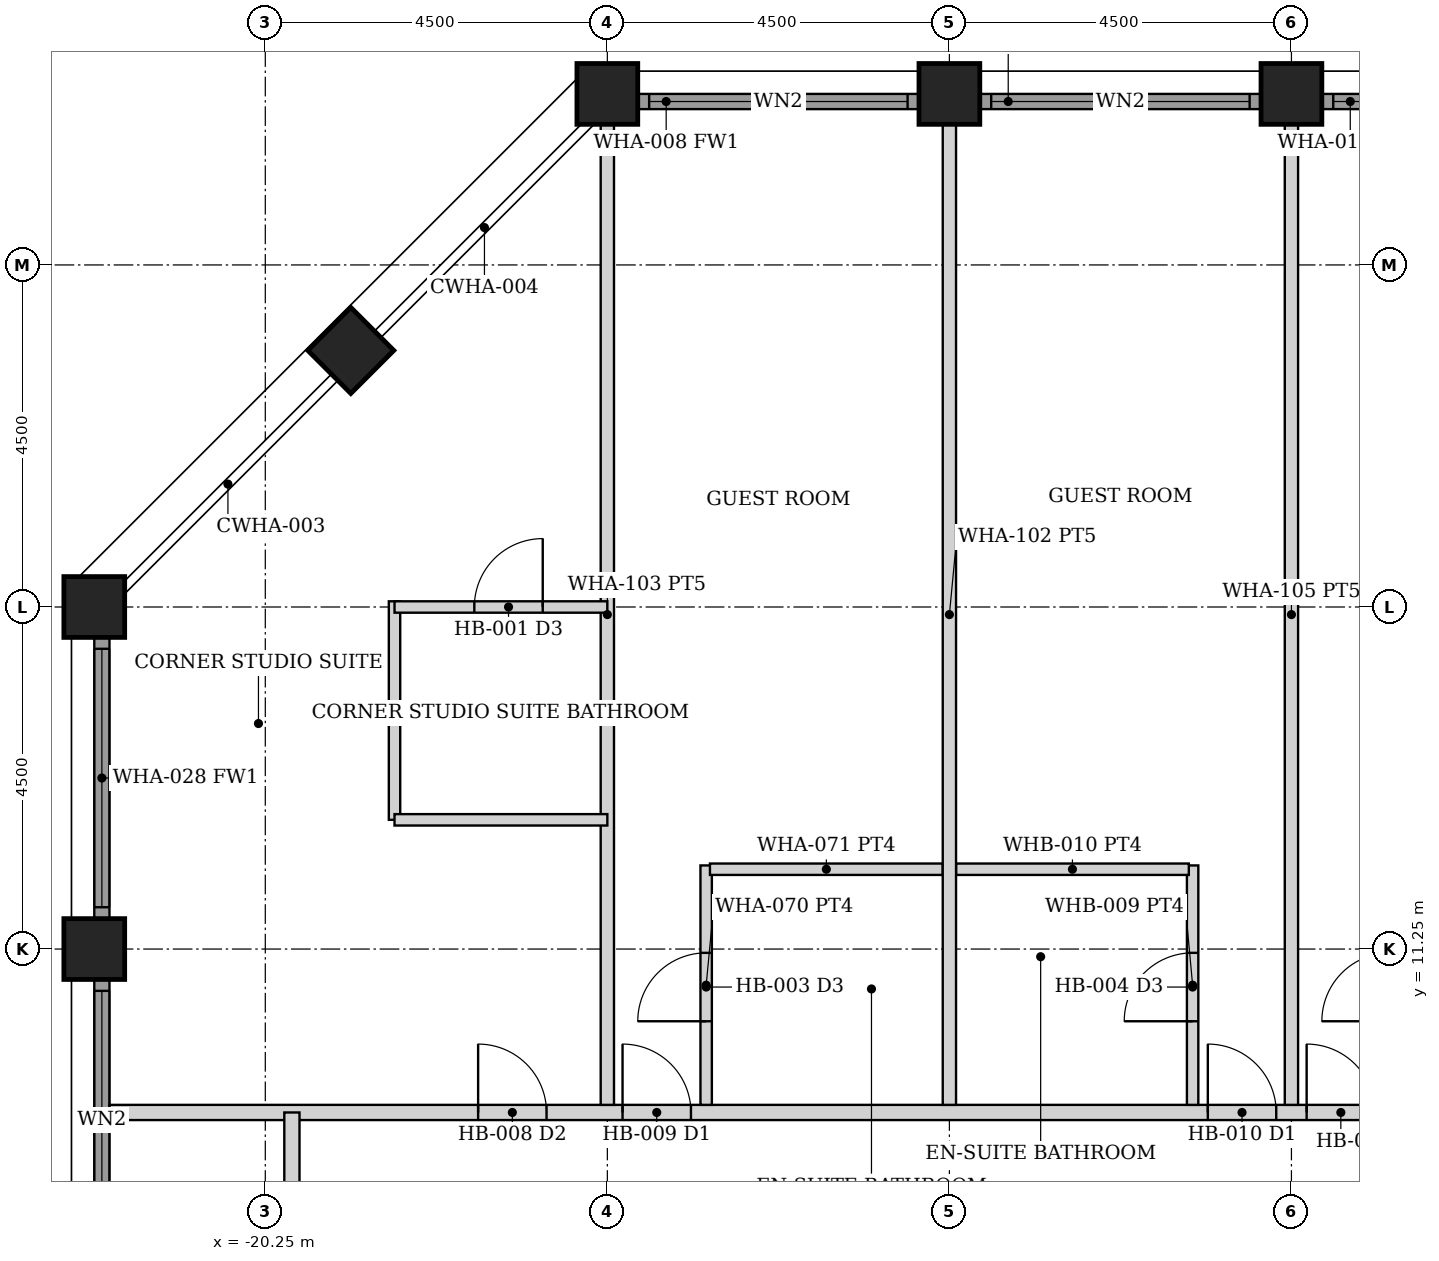
"""IFC4 building model, lengths in metres.
Left out: names, types, materials, properties, quantities, classifications, styles, units other than length and angle.
Written with IfcOpenShell. Run it as: python <this file> out.ifc"""

import sys

from ifc_helpers import new_model, si_unit, direction, frame, frame_2d, origin, origin_2d, place, context, subcontext, project, spatial, rectangle, hollow_rectangle, extrude, element, fill, save


model = new_model("IFC4")
c1 = context("Model", 3, precision=1e-05, world=origin(), true_north=direction((0.0, 1.0)))
c2 = subcontext(c1, "Body", "Model", "MODEL_VIEW")
j1 = project(units=[si_unit("LENGTHUNIT", "METRE"), si_unit("PLANEANGLEUNIT", "RADIAN")], contexts=[c1])
p1 = place(None, origin())
s1 = spatial("IfcSite", under=j1, at=p1, CompositionType="ELEMENT")
p2 = place(p1, origin())
s2 = spatial("IfcBuilding", under=s1, at=p2, CompositionType="ELEMENT")
p3 = place(p2, frame((0.0, 0.0, 129.2)))
s3 = spatial("IfcBuildingStorey", under=s2, at=p3, CompositionType="ELEMENT", Elevation=129.2)
for number, where, z_axis, x_axis in (
    (1, (-15.75, 22.5, 0.0), (0.0, 0.0, 1.0), (0.0, 1.0, 0.0)),
    (2, (-11.25, 22.5, 0.0), (0.0, 0.0, 1.0), (0.0, 1.0, 0.0)),
    (3, (-6.75, 22.5, 0.0), (0.0, 0.0, 1.0), (0.0, 1.0, 0.0)),
    (4, (-22.5, 11.25, 0.0), (0.0, 0.0, 1.0), (1.0, 0.0, 0.0)),
    (5, (-22.5, 15.75, 0.0), (0.0, 0.0, 1.0), (1.0, 0.0, 0.0)),
    (6, (-19.125, 19.125, 0.0), (0.0, 0.0, 1.0), (0.707, -0.707, 0.0)),
):
    element("IfcColumn", number, at=place(p3, frame(where, z_axis=z_axis, x_axis=x_axis)), inside=s3, PredefinedType="COLUMN", context=c2, shape_type="SweptSolid", body=[
        extrude(hollow_rectangle(XDim=0.8, YDim=0.8, WallThickness=0.06, at=origin_2d()), origin(), (0.0, 0.0, 1.0), 3.6),
    ])
p4 = place(p3, frame((-15.345, 22.4, 0.0), z_axis=(0.0, 0.0, 1.0), x_axis=(1.0, 0.0, 0.0)))
e7 = element("IfcWall", 7, at=p4, inside=s3, PredefinedType="SOLIDWALL", context=c2, shape_type="SweptSolid", body=[
    extrude(rectangle(XDim=3.69, YDim=0.2, at=frame_2d((1.845, 0.0))), origin(), (0.0, 0.0, 1.0), 2.479),
])
p5 = place(p4, frame((0.145, 0.0, 0.3)))
e8 = element("IfcOpeningElement", 8, at=p5, cuts=e7, PredefinedType="OPENING", context=c2, shape_type="SweptSolid", body=[
    extrude(rectangle(XDim=3.4, YDim=2.029, at=frame_2d((1.7, 1.015))), frame((0.0, 0.11, 0.0), z_axis=(0.0, -1.0, 0.0), x_axis=(1.0, 0.0, 0.0)), (0.0, 0.0, 1.0), 0.22),
])
p6 = place(p3, frame((-10.845, 22.4, 0.0), z_axis=(0.0, 0.0, 1.0), x_axis=(1.0, 0.0, 0.0)))
e9 = element("IfcWall", 9, at=p6, inside=s3, PredefinedType="SOLIDWALL", context=c2, shape_type="SweptSolid", body=[
    extrude(rectangle(XDim=3.69, YDim=0.2, at=frame_2d((1.845, 0.0))), origin(), (0.0, 0.0, 1.0), 2.479),
])
p7 = place(p6, frame((0.145, 0.0, 0.3)))
e10 = element("IfcOpeningElement", 10, at=p7, cuts=e9, PredefinedType="OPENING", context=c2, shape_type="SweptSolid", body=[
    extrude(rectangle(XDim=3.4, YDim=2.029, at=frame_2d((1.7, 1.015))), frame((0.0, 0.11, 0.0), z_axis=(0.0, -1.0, 0.0), x_axis=(1.0, 0.0, 0.0)), (0.0, 0.0, 1.0), 0.22),
])
p8 = place(p3, frame((-6.345, 22.4, 0.0), z_axis=(0.0, 0.0, 1.0), x_axis=(1.0, 0.0, 0.0)))
e11 = element("IfcWall", 11, at=p8, inside=s3, PredefinedType="SOLIDWALL", context=c2, shape_type="SweptSolid", body=[
    extrude(rectangle(XDim=3.69, YDim=0.2, at=frame_2d((1.845, 0.0))), origin(), (0.0, 0.0, 1.0), 2.479),
])
p9 = place(p8, frame((0.145, 0.0, 0.3)))
e12 = element("IfcOpeningElement", 12, at=p9, cuts=e11, PredefinedType="OPENING", context=c2, shape_type="SweptSolid", body=[
    extrude(rectangle(XDim=3.4, YDim=2.029, at=frame_2d((1.7, 1.015))), frame((0.0, 0.11, 0.0), z_axis=(0.0, -1.0, 0.0), x_axis=(1.0, 0.0, 0.0)), (0.0, 0.0, 1.0), 0.22),
])
p10 = place(p3, frame((-22.4, 7.155, 0.0), z_axis=(0.0, 0.0, 1.0), x_axis=(0.0, 1.0, 0.0)))
e13 = element("IfcWall", 13, at=p10, inside=s3, PredefinedType="SOLIDWALL", context=c2, shape_type="SweptSolid", body=[
    extrude(rectangle(XDim=3.69, YDim=0.2, at=frame_2d((1.845, 0.0))), origin(), (0.0, 0.0, 1.0), 2.479),
])
p11 = place(p10, frame((0.145, 0.0, 0.3)))
e14 = element("IfcOpeningElement", 14, at=p11, cuts=e13, PredefinedType="OPENING", context=c2, shape_type="SweptSolid", body=[
    extrude(rectangle(XDim=3.4, YDim=2.029, at=frame_2d((1.7, 1.015))), frame((0.0, 0.11, 0.0), z_axis=(0.0, -1.0, 0.0), x_axis=(1.0, 0.0, 0.0)), (0.0, 0.0, 1.0), 0.22),
])
p12 = place(p3, frame((-22.4, 11.655, 0.0), z_axis=(0.0, 0.0, 1.0), x_axis=(0.0, 1.0, 0.0)))
e15 = element("IfcWall", 15, at=p12, inside=s3, PredefinedType="SOLIDWALL", context=c2, shape_type="SweptSolid", body=[
    extrude(rectangle(XDim=3.69, YDim=0.2, at=frame_2d((1.845, 0.0))), origin(), (0.0, 0.0, 1.0), 2.479),
])
p13 = place(p12, frame((0.145, 0.0, 0.3)))
e16 = element("IfcOpeningElement", 16, at=p13, cuts=e15, PredefinedType="OPENING", context=c2, shape_type="SweptSolid", body=[
    extrude(rectangle(XDim=3.4, YDim=2.029, at=frame_2d((1.7, 1.015))), frame((0.0, 0.11, 0.0), z_axis=(0.0, -1.0, 0.0), x_axis=(1.0, 0.0, 0.0)), (0.0, 0.0, 1.0), 0.22),
])
p14 = place(p3, frame((-22.3, 9.1, 0.0), z_axis=(0.0, 0.0, 1.0), x_axis=(1.0, 0.0, 0.0)))
e17 = element("IfcWall", 17, at=p14, inside=s3, PredefinedType="PARTITIONING", context=c2, shape_type="SweptSolid", body=[
    extrude(rectangle(XDim=44.6, YDim=0.2, at=frame_2d((22.3, 0.0))), origin(), (0.0, 0.0, 1.0), 2.473),
])
p15 = place(p14, frame((6.75, 0.0, 0.0)))
e18 = element("IfcOpeningElement", 18, at=p15, cuts=e17, PredefinedType="OPENING", context=c2, shape_type="SweptSolid", body=[
    extrude(rectangle(XDim=0.9, YDim=2.1, at=frame_2d((0.45, 1.05))), frame((0.0, 0.11, 0.0), z_axis=(0.0, -1.0, 0.0), x_axis=(1.0, 0.0, 0.0)), (0.0, 0.0, 1.0), 0.22),
])
p16 = place(p14, frame((14.45, 0.0, 0.0)))
e19 = element("IfcOpeningElement", 19, at=p16, cuts=e17, PredefinedType="OPENING", context=c2, shape_type="SweptSolid", body=[
    extrude(rectangle(XDim=0.9, YDim=2.1, at=frame_2d((0.45, 1.05))), frame((0.0, 0.11, 0.0), z_axis=(0.0, -1.0, 0.0), x_axis=(1.0, 0.0, 0.0)), (0.0, 0.0, 1.0), 0.22),
])
p17 = place(p14, frame((15.75, 0.0, 0.0)))
e20 = element("IfcOpeningElement", 20, at=p17, cuts=e17, PredefinedType="OPENING", context=c2, shape_type="SweptSolid", body=[
    extrude(rectangle(XDim=0.9, YDim=2.1, at=frame_2d((0.45, 1.05))), frame((0.0, 0.11, 0.0), z_axis=(0.0, -1.0, 0.0), x_axis=(1.0, 0.0, 0.0)), (0.0, 0.0, 1.0), 0.22),
])
p18 = place(p14, frame((32.45, 0.0, 0.0)))
e21 = element("IfcOpeningElement", 21, at=p18, cuts=e17, PredefinedType="OPENING", context=c2, shape_type="SweptSolid", body=[
    extrude(rectangle(XDim=0.9, YDim=2.1, at=frame_2d((0.45, 1.05))), frame((0.0, 0.11, 0.0), z_axis=(0.0, -1.0, 0.0), x_axis=(1.0, 0.0, 0.0)), (0.0, 0.0, 1.0), 0.22),
])
p19 = place(p14, frame((33.75, 0.0, 0.0)))
e22 = element("IfcOpeningElement", 22, at=p19, cuts=e17, PredefinedType="OPENING", context=c2, shape_type="SweptSolid", body=[
    extrude(rectangle(XDim=0.9, YDim=2.1, at=frame_2d((0.45, 1.05))), frame((0.0, 0.11, 0.0), z_axis=(0.0, -1.0, 0.0), x_axis=(1.0, 0.0, 0.0)), (0.0, 0.0, 1.0), 0.22),
])
p20 = place(p14, frame((38.85, 0.0, 0.0)))
e23 = element("IfcOpeningElement", 23, at=p20, cuts=e17, PredefinedType="OPENING", context=c2, shape_type="SweptSolid", body=[
    extrude(rectangle(XDim=0.9, YDim=2.1, at=frame_2d((0.45, 1.05))), frame((0.0, 0.11, 0.0), z_axis=(0.0, -1.0, 0.0), x_axis=(1.0, 0.0, 0.0)), (0.0, 0.0, 1.0), 0.22),
])
p21 = place(p14, frame((4.85, 0.0, 0.0)))
e24 = element("IfcOpeningElement", 24, at=p21, cuts=e17, PredefinedType="OPENING", context=c2, shape_type="SweptSolid", body=[
    extrude(rectangle(XDim=0.9, YDim=2.1, at=frame_2d((0.45, 1.05))), frame((0.0, 0.11, 0.0), z_axis=(0.0, -1.0, 0.0), x_axis=(1.0, 0.0, 0.0)), (0.0, 0.0, 1.0), 0.22),
])
p22 = place(p3, frame((-19.9, -9.1, 0.0), z_axis=(0.0, 0.0, 1.0), x_axis=(0.0, 1.0, 0.0)))
e25 = element("IfcWall", 25, at=p22, inside=s3, PredefinedType="PARTITIONING", context=c2, shape_type="SweptSolid", body=[
    extrude(rectangle(XDim=18.2, YDim=0.2, at=frame_2d((9.1, 0.0))), origin(), (0.0, 0.0, 1.0), 2.473),
])
p23 = place(p22, frame((8.425, 0.0, 0.0)))
e26 = element("IfcOpeningElement", 26, at=p23, cuts=e25, PredefinedType="OPENING", context=c2, shape_type="SweptSolid", body=[
    extrude(rectangle(XDim=1.35, YDim=2.1, at=frame_2d((0.675, 1.05))), frame((0.0, 0.11, 0.0), z_axis=(0.0, -1.0, 0.0), x_axis=(1.0, 0.0, 0.0)), (0.0, 0.0, 1.0), 0.22),
])
p24 = place(p3, frame((-14.45, 9.2, 0.0), z_axis=(0.0, 0.0, 1.0), x_axis=(0.0, 1.0, 0.0)))
e27 = element("IfcWall", 27, at=p24, inside=s3, PredefinedType="PARTITIONING", context=c2, shape_type="SweptSolid", body=[
    extrude(rectangle(XDim=3.15, YDim=0.15, at=frame_2d((1.575, 0.0))), origin(), (0.0, 0.0, 1.0), 2.473),
])
p25 = place(p24, frame((1.1, 0.0, 0.0)))
e28 = element("IfcOpeningElement", 28, at=p25, cuts=e27, PredefinedType="OPENING", context=c2, shape_type="SweptSolid", body=[
    extrude(rectangle(XDim=0.9, YDim=2.1, at=frame_2d((0.45, 1.05))), frame((0.0, 0.085, 0.0), z_axis=(0.0, -1.0, 0.0), x_axis=(1.0, 0.0, 0.0)), (0.0, 0.0, 1.0), 0.17),
])
p26 = place(p3, frame((-14.4, 12.3, 0.0), z_axis=(0.0, 0.0, 1.0), x_axis=(1.0, 0.0, 0.0)))
e29 = element("IfcWall", 29, at=p26, inside=s3, PredefinedType="PARTITIONING", context=c2, shape_type="SweptSolid", body=[
    extrude(rectangle(XDim=3.062, YDim=0.15, at=frame_2d((1.531, 0.0))), origin(), (0.0, 0.0, 1.0), 2.473),
])
p27 = place(p3, frame((-8.05, 9.2, 0.0), z_axis=(0.0, 0.0, 1.0), x_axis=(0.0, 1.0, 0.0)))
e30 = element("IfcWall", 30, at=p27, inside=s3, PredefinedType="PARTITIONING", context=c2, shape_type="SweptSolid", body=[
    extrude(rectangle(XDim=3.15, YDim=0.15, at=frame_2d((1.575, 0.0))), origin(), (0.0, 0.0, 1.0), 2.473),
])
p28 = place(p27, frame((1.1, 0.0, 0.0)))
e31 = element("IfcOpeningElement", 31, at=p28, cuts=e30, PredefinedType="OPENING", context=c2, shape_type="SweptSolid", body=[
    extrude(rectangle(XDim=0.9, YDim=2.1, at=frame_2d((0.45, 1.05))), frame((0.0, 0.085, 0.0), z_axis=(0.0, -1.0, 0.0), x_axis=(1.0, 0.0, 0.0)), (0.0, 0.0, 1.0), 0.17),
])
p29 = place(p3, frame((-11.163, 12.3, 0.0), z_axis=(0.0, 0.0, 1.0), x_axis=(1.0, 0.0, 0.0)))
e32 = element("IfcWall", 32, at=p29, inside=s3, PredefinedType="PARTITIONING", context=c2, shape_type="SweptSolid", body=[
    extrude(rectangle(XDim=3.062, YDim=0.15, at=frame_2d((1.531, 0.0))), origin(), (0.0, 0.0, 1.0), 2.473),
])
for number, where, z_axis, x_axis in (
    (33, (-15.75, 9.2, 0.0), (0.0, 0.0, 1.0), (0.0, 1.0, 0.0)),
    (34, (-11.25, 9.2, 0.0), (0.0, 0.0, 1.0), (0.0, 1.0, 0.0)),
    (35, (-6.75, 9.2, 0.0), (0.0, 0.0, 1.0), (0.0, 1.0, 0.0)),
):
    element("IfcWall", number, at=place(p3, frame(where, z_axis=z_axis, x_axis=x_axis)), inside=s3, PredefinedType="PARTITIONING", context=c2, shape_type="SweptSolid", body=[
        extrude(rectangle(XDim=12.9, YDim=0.175, at=frame_2d((6.45, 0.0))), origin(), (0.0, 0.0, 1.0), 2.473),
    ])
p30 = place(p3, frame((-18.55, 12.95, 0.0), z_axis=(0.0, 0.0, 1.0), x_axis=(0.0, 1.0, 0.0)))
e36 = element("IfcWall", 36, at=p30, inside=s3, PredefinedType="PARTITIONING", context=c2, shape_type="SweptSolid", body=[
    extrude(rectangle(XDim=2.875, YDim=0.15, at=frame_2d((1.438, 0.0))), origin(), (0.0, 0.0, 1.0), 2.473),
])
p31 = place(p3, frame((-18.55, 12.95, 0.0), z_axis=(0.0, 0.0, 1.0), x_axis=(1.0, 0.0, 0.0)))
e37 = element("IfcWall", 37, at=p31, inside=s3, PredefinedType="PARTITIONING", context=c2, shape_type="SweptSolid", body=[
    extrude(rectangle(XDim=2.8, YDim=0.15, at=frame_2d((1.4, 0.0))), origin(), (0.0, 0.0, 1.0), 2.473),
])
p32 = place(p3, frame((-18.55, 15.75, 0.0), z_axis=(0.0, 0.0, 1.0), x_axis=(1.0, 0.0, 0.0)))
e38 = element("IfcWall", 38, at=p32, inside=s3, PredefinedType="PARTITIONING", context=c2, shape_type="SweptSolid", body=[
    extrude(rectangle(XDim=2.8, YDim=0.15, at=frame_2d((1.4, 0.0))), origin(), (0.0, 0.0, 1.0), 2.473),
])
p33 = place(p32, frame((1.05, 0.0, 0.0)))
e39 = element("IfcOpeningElement", 39, at=p33, cuts=e38, PredefinedType="OPENING", context=c2, shape_type="SweptSolid", body=[
    extrude(rectangle(XDim=0.9, YDim=2.1, at=frame_2d((0.45, 1.05))), frame((0.0, 0.085, 0.0), z_axis=(0.0, -1.0, 0.0), x_axis=(1.0, 0.0, 0.0)), (0.0, 0.0, 1.0), 0.17),
])
p34 = place(p5, origin())
e40 = element("IfcWindow", 40, at=p34, inside=s3, PartitioningType="SINGLE_PANEL", PredefinedType="WINDOW", context=c2, shape_type="SweptSolid", body=[
    extrude(rectangle(XDim=3.4, YDim=2.029, at=frame_2d((1.7, 1.015))), frame((0.0, 0.03, 0.0), z_axis=(0.0, -1.0, 0.0), x_axis=(1.0, 0.0, 0.0)), (0.0, 0.0, 1.0), 0.06),
])
fill(e8, e40)
p35 = place(p7, origin())
e41 = element("IfcWindow", 41, at=p35, inside=s3, PartitioningType="SINGLE_PANEL", PredefinedType="WINDOW", context=c2, shape_type="SweptSolid", body=[
    extrude(rectangle(XDim=3.4, YDim=2.029, at=frame_2d((1.7, 1.015))), frame((0.0, 0.03, 0.0), z_axis=(0.0, -1.0, 0.0), x_axis=(1.0, 0.0, 0.0)), (0.0, 0.0, 1.0), 0.06),
])
fill(e10, e41)
p36 = place(p9, origin())
e42 = element("IfcWindow", 42, at=p36, inside=s3, PartitioningType="SINGLE_PANEL", PredefinedType="WINDOW", context=c2, shape_type="SweptSolid", body=[
    extrude(rectangle(XDim=3.4, YDim=2.029, at=frame_2d((1.7, 1.015))), frame((0.0, 0.03, 0.0), z_axis=(0.0, -1.0, 0.0), x_axis=(1.0, 0.0, 0.0)), (0.0, 0.0, 1.0), 0.06),
])
fill(e12, e42)
p37 = place(p11, origin())
e43 = element("IfcWindow", 43, at=p37, inside=s3, PartitioningType="SINGLE_PANEL", PredefinedType="WINDOW", context=c2, shape_type="SweptSolid", body=[
    extrude(rectangle(XDim=3.4, YDim=2.029, at=frame_2d((1.7, 1.015))), frame((0.0, 0.03, 0.0), z_axis=(0.0, -1.0, 0.0), x_axis=(1.0, 0.0, 0.0)), (0.0, 0.0, 1.0), 0.06),
])
fill(e14, e43)
p38 = place(p13, origin())
e44 = element("IfcWindow", 44, at=p38, inside=s3, PartitioningType="SINGLE_PANEL", PredefinedType="WINDOW", context=c2, shape_type="SweptSolid", body=[
    extrude(rectangle(XDim=3.4, YDim=2.029, at=frame_2d((1.7, 1.015))), frame((0.0, 0.03, 0.0), z_axis=(0.0, -1.0, 0.0), x_axis=(1.0, 0.0, 0.0)), (0.0, 0.0, 1.0), 0.06),
])
fill(e16, e44)
p39 = place(p15, origin())
e45 = element("IfcDoor", 45, at=p39, inside=s3, OperationType="SINGLE_SWING_LEFT", PredefinedType="DOOR", context=c2, shape_type="SweptSolid", body=[
    extrude(rectangle(XDim=0.9, YDim=2.1, at=frame_2d((0.45, 1.05))), frame((0.0, 0.025, 0.0), z_axis=(0.0, -1.0, 0.0), x_axis=(1.0, 0.0, 0.0)), (0.0, 0.0, 1.0), 0.05),
])
fill(e18, e45)
p40 = place(p25, origin())
e46 = element("IfcDoor", 46, at=p40, inside=s3, OperationType="SINGLE_SWING_LEFT", PredefinedType="DOOR", context=c2, shape_type="SweptSolid", body=[
    extrude(rectangle(XDim=0.9, YDim=2.1, at=frame_2d((0.45, 1.05))), frame((0.0, 0.025, 0.0), z_axis=(0.0, -1.0, 0.0), x_axis=(1.0, 0.0, 0.0)), (0.0, 0.0, 1.0), 0.05),
])
fill(e28, e46)
p41 = place(p16, origin())
e47 = element("IfcDoor", 47, at=p41, inside=s3, OperationType="SINGLE_SWING_LEFT", PredefinedType="DOOR", context=c2, shape_type="SweptSolid", body=[
    extrude(rectangle(XDim=0.9, YDim=2.1, at=frame_2d((0.45, 1.05))), frame((0.0, 0.025, 0.0), z_axis=(0.0, -1.0, 0.0), x_axis=(1.0, 0.0, 0.0)), (0.0, 0.0, 1.0), 0.05),
])
fill(e19, e47)
p42 = place(p28, origin())
e48 = element("IfcDoor", 48, at=p42, inside=s3, OperationType="SINGLE_SWING_LEFT", PredefinedType="DOOR", context=c2, shape_type="SweptSolid", body=[
    extrude(rectangle(XDim=0.9, YDim=2.1, at=frame_2d((0.45, 1.05))), frame((0.0, 0.025, 0.0), z_axis=(0.0, -1.0, 0.0), x_axis=(1.0, 0.0, 0.0)), (0.0, 0.0, 1.0), 0.05),
])
fill(e31, e48)
p43 = place(p17, origin())
e49 = element("IfcDoor", 49, at=p43, inside=s3, OperationType="SINGLE_SWING_LEFT", PredefinedType="DOOR", context=c2, shape_type="SweptSolid", body=[
    extrude(rectangle(XDim=0.9, YDim=2.1, at=frame_2d((0.45, 1.05))), frame((0.0, 0.025, 0.0), z_axis=(0.0, -1.0, 0.0), x_axis=(1.0, 0.0, 0.0)), (0.0, 0.0, 1.0), 0.05),
])
fill(e20, e49)
p44 = place(p21, origin())
e50 = element("IfcDoor", 50, at=p44, inside=s3, OperationType="SINGLE_SWING_LEFT", PredefinedType="DOOR", context=c2, shape_type="SweptSolid", body=[
    extrude(rectangle(XDim=0.9, YDim=2.1, at=frame_2d((0.45, 1.05))), frame((0.0, 0.025, 0.0), z_axis=(0.0, -1.0, 0.0), x_axis=(1.0, 0.0, 0.0)), (0.0, 0.0, 1.0), 0.05),
])
fill(e24, e50)
p45 = place(p33, origin())
e51 = element("IfcDoor", 51, at=p45, inside=s3, OperationType="SINGLE_SWING_RIGHT", PredefinedType="DOOR", context=c2, shape_type="SweptSolid", body=[
    extrude(rectangle(XDim=0.9, YDim=2.1, at=frame_2d((0.45, 1.05))), frame((0.0, 0.025, 0.0), z_axis=(0.0, -1.0, 0.0), x_axis=(1.0, 0.0, 0.0)), (0.0, 0.0, 1.0), 0.05),
])
fill(e39, e51)
save(model, sys.argv[1])
